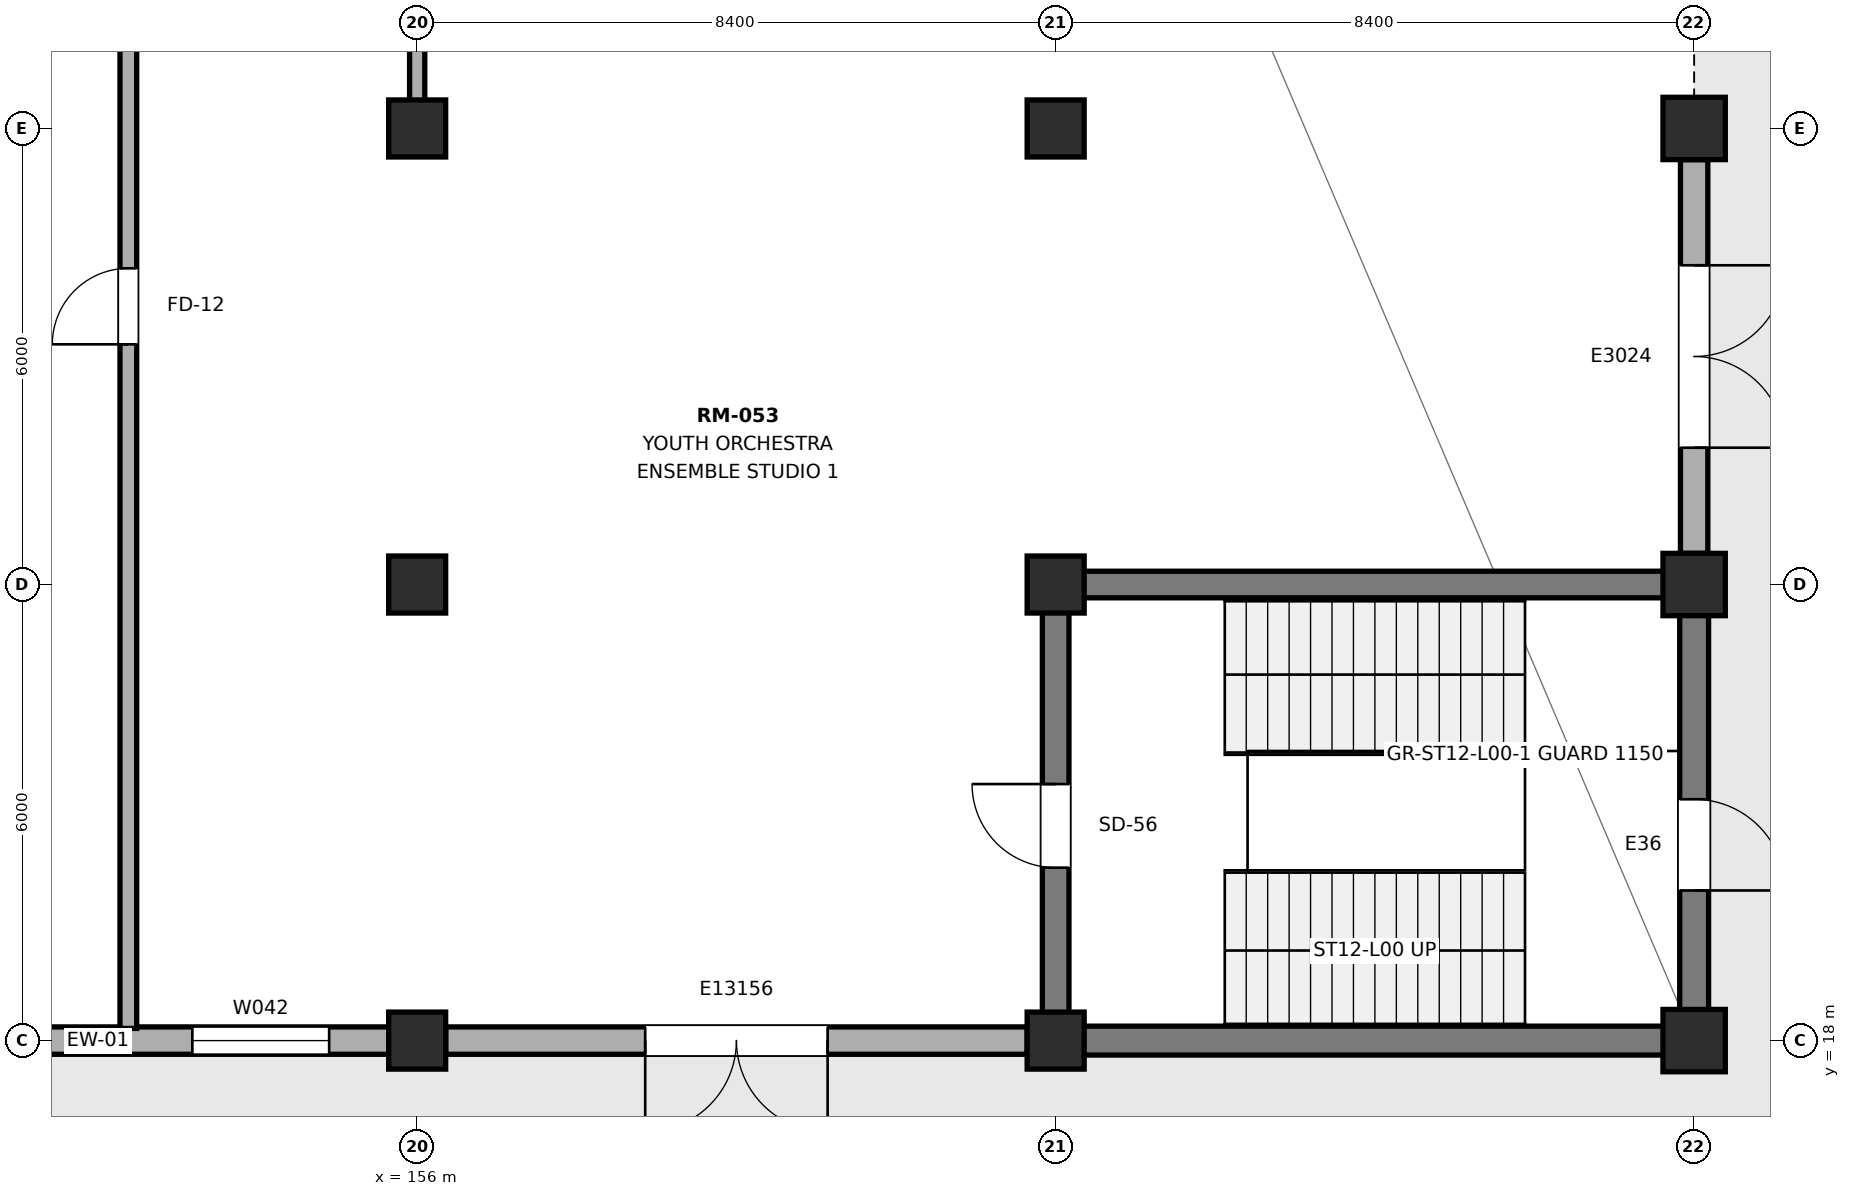
"""IFC4 building model, lengths in metres.
Left out: names, types, materials, properties, quantities, classifications, styles, units other than length and angle.
Written with IfcOpenShell. Run it as: python <this file> out.ifc"""

import sys

from ifc_helpers import new_model, si_unit, direction, frame, frame_2d, origin, origin_2d, place, context, subcontext, project, spatial, rectangle, extrude, element, fill, save


model = new_model("IFC4")
c1 = context("Model", 3, precision=1e-05, world=origin(), true_north=direction((0.0, 1.0)))
c2 = subcontext(c1, "Body", "Model", "MODEL_VIEW")
j1 = project(units=[si_unit("LENGTHUNIT", "METRE"), si_unit("PLANEANGLEUNIT", "RADIAN")], contexts=[c1])
p1 = place(None, origin())
s1 = spatial("IfcSite", under=j1, at=p1, CompositionType="ELEMENT")
p2 = place(p1, origin())
s2 = spatial("IfcBuilding", under=s1, at=p2, CompositionType="ELEMENT")
p3 = place(p2, origin())
s3 = spatial("IfcBuildingStorey", under=s2, at=p3, CompositionType="ELEMENT", Elevation=0.0)
for number, where, z_axis, x_axis in (
    (1, (156.0, 18.0, 0.0), (0.0, 0.0, 1.0), (1.0, 0.0, 0.0)),
    (2, (156.0, 24.0, 0.0), (0.0, 0.0, 1.0), (1.0, 0.0, 0.0)),
    (3, (156.0, 30.0, 0.0), (0.0, 0.0, 1.0), (1.0, 0.0, 0.0)),
    (4, (164.4, 18.0, 0.0), (0.0, 0.0, 1.0), (1.0, 0.0, 0.0)),
    (5, (164.4, 24.0, 0.0), (0.0, 0.0, 1.0), (1.0, 0.0, 0.0)),
    (6, (164.4, 30.0, 0.0), (0.0, 0.0, 1.0), (1.0, 0.0, 0.0)),
):
    element("IfcColumn", number, at=place(p3, frame(where, z_axis=z_axis, x_axis=x_axis)), inside=s3, PredefinedType="COLUMN", context=c2, shape_type="SweptSolid", body=[
        extrude(rectangle(XDim=0.75, YDim=0.75, at=origin_2d()), origin(), (0.0, 0.0, 1.0), 5.4),
    ])
for number, where, z_axis, x_axis in (
    (7, (172.8, 18.0, 0.0), (0.0, 0.0, 1.0), (1.0, 0.0, 0.0)),
    (8, (172.8, 24.0, 0.0), (0.0, 0.0, 1.0), (1.0, 0.0, 0.0)),
    (9, (172.8, 30.0, 0.0), (0.0, 0.0, 1.0), (1.0, 0.0, 0.0)),
):
    element("IfcColumn", number, at=place(p3, frame(where, z_axis=z_axis, x_axis=x_axis)), inside=s3, PredefinedType="COLUMN", context=c2, shape_type="SweptSolid", body=[
        extrude(rectangle(XDim=0.82, YDim=0.82, at=origin_2d()), origin(), (0.0, 0.0, 1.0), 5.4),
    ])
p4 = place(p3, frame((164.225, 18.0, 0.0), z_axis=(0.0, 0.0, 1.0), x_axis=(1.0, 0.0, 0.0)))
e10 = element("IfcWall", 10, at=p4, inside=s3, PredefinedType="SHEAR", context=c2, shape_type="SweptSolid", body=[
    extrude(rectangle(XDim=8.75, YDim=0.38, at=frame_2d((4.375, 0.0))), origin(), (0.0, 0.0, 1.0), 5.4),
])
p5 = place(p3, frame((164.225, 24.0, 0.0), z_axis=(0.0, 0.0, 1.0), x_axis=(1.0, 0.0, 0.0)))
e11 = element("IfcWall", 11, at=p5, inside=s3, PredefinedType="SHEAR", context=c2, shape_type="SweptSolid", body=[
    extrude(rectangle(XDim=8.75, YDim=0.35, at=frame_2d((4.375, 0.0))), origin(), (0.0, 0.0, 1.0), 5.4),
])
p6 = place(p3, frame((164.4, 18.175, 0.0), z_axis=(0.0, 0.0, 1.0), x_axis=(0.0, 1.0, 0.0)))
e12 = element("IfcWall", 12, at=p6, inside=s3, PredefinedType="SHEAR", context=c2, shape_type="SweptSolid", body=[
    extrude(rectangle(XDim=5.65, YDim=0.35, at=frame_2d((2.825, 0.0))), origin(), (0.0, 0.0, 1.0), 5.4),
])
p7 = place(p6, frame((2.1, 0.0, 0.0)))
e13 = element("IfcOpeningElement", 13, at=p7, cuts=e12, PredefinedType="OPENING", context=c2, shape_type="SweptSolid", body=[
    extrude(rectangle(XDim=1.1, YDim=2.2, at=frame_2d((0.55, 1.1))), frame((0.0, 0.185, 0.0), z_axis=(0.0, -1.0, 0.0), x_axis=(1.0, 0.0, 0.0)), (0.0, 0.0, 1.0), 0.37),
])
p8 = place(p3, frame((172.8, 18.175, 0.0), z_axis=(0.0, 0.0, 1.0), x_axis=(0.0, 1.0, 0.0)))
e14 = element("IfcWall", 14, at=p8, inside=s3, PredefinedType="SHEAR", context=c2, shape_type="SweptSolid", body=[
    extrude(rectangle(XDim=5.65, YDim=0.38, at=frame_2d((2.825, 0.0))), origin(), (0.0, 0.0, 1.0), 5.4),
])
p9 = place(p8, frame((1.8, 0.0, 0.0)))
e15 = element("IfcOpeningElement", 15, at=p9, cuts=e14, PredefinedType="OPENING", context=c2, shape_type="SweptSolid", body=[
    extrude(rectangle(XDim=1.2, YDim=2.3, at=frame_2d((0.6, 1.15))), frame((0.0, 0.2, 0.0), z_axis=(0.0, -1.0, 0.0), x_axis=(1.0, 0.0, 0.0)), (0.0, 0.0, 1.0), 0.4),
])
p10 = place(p3, frame((147.975, 18.0, 0.0), z_axis=(0.0, 0.0, 1.0), x_axis=(1.0, 0.0, 0.0)))
e16 = element("IfcWall", 16, at=p10, inside=s3, PredefinedType="SOLIDWALL", context=c2, shape_type="SweptSolid", body=[
    extrude(rectangle(XDim=7.65, YDim=0.36, at=frame_2d((3.825, 0.0))), origin(), (0.0, 0.0, 1.0), 4.35),
])
p11 = place(p10, frame((5.067, 0.0, 0.9)))
e17 = element("IfcOpeningElement", 17, at=p11, cuts=e16, PredefinedType="OPENING", context=c2, shape_type="SweptSolid", body=[
    extrude(rectangle(XDim=1.8, YDim=1.8, at=frame_2d((0.9, 0.9))), frame((0.0, 0.19, 0.0), z_axis=(0.0, -1.0, 0.0), x_axis=(1.0, 0.0, 0.0)), (0.0, 0.0, 1.0), 0.38),
])
p12 = place(p3, frame((156.375, 18.0, 0.0), z_axis=(0.0, 0.0, 1.0), x_axis=(1.0, 0.0, 0.0)))
e18 = element("IfcWall", 18, at=p12, inside=s3, PredefinedType="SOLIDWALL", context=c2, shape_type="SweptSolid", body=[
    extrude(rectangle(XDim=7.65, YDim=0.36, at=frame_2d((3.825, 0.0))), origin(), (0.0, 0.0, 1.0), 4.35),
])
p13 = place(p12, frame((2.625, 0.0, 0.0)))
e19 = element("IfcOpeningElement", 19, at=p13, cuts=e18, PredefinedType="OPENING", context=c2, shape_type="SweptSolid", body=[
    extrude(rectangle(XDim=2.4, YDim=2.6, at=frame_2d((1.2, 1.3))), frame((0.0, 0.19, 0.0), z_axis=(0.0, -1.0, 0.0), x_axis=(1.0, 0.0, 0.0)), (0.0, 0.0, 1.0), 0.38),
])
p14 = place(p3, frame((172.8, 24.41, 0.0), z_axis=(0.0, 0.0, 1.0), x_axis=(0.0, 1.0, 0.0)))
e20 = element("IfcWall", 20, at=p14, inside=s3, PredefinedType="SOLIDWALL", context=c2, shape_type="SweptSolid", body=[
    extrude(rectangle(XDim=5.18, YDim=0.36, at=frame_2d((2.59, 0.0))), origin(), (0.0, 0.0, 1.0), 4.4),
])
p15 = place(p14, frame((1.39, 0.0, 0.0)))
e21 = element("IfcOpeningElement", 21, at=p15, cuts=e20, PredefinedType="OPENING", context=c2, shape_type="SweptSolid", body=[
    extrude(rectangle(XDim=2.4, YDim=2.6, at=frame_2d((1.2, 1.3))), frame((0.0, 0.19, 0.0), z_axis=(0.0, -1.0, 0.0), x_axis=(1.0, 0.0, 0.0)), (0.0, 0.0, 1.0), 0.38),
])
p16 = place(p3, frame((152.2, 18.16, 0.0), z_axis=(0.0, 0.0, 1.0), x_axis=(0.0, 1.0, 0.0)))
e22 = element("IfcWall", 22, at=p16, inside=s3, PredefinedType="PARTITIONING", context=c2, shape_type="SweptSolid", body=[
    extrude(rectangle(XDim=20.08, YDim=0.22, at=frame_2d((10.04, 0.0))), origin(), (0.0, 0.0, 1.0), 5.09),
])
p17 = place(p16, frame((9.0, 0.0, 0.0)))
e23 = element("IfcOpeningElement", 23, at=p17, cuts=e22, PredefinedType="OPENING", context=c2, shape_type="SweptSolid", body=[
    extrude(rectangle(XDim=1.0, YDim=2.2, at=frame_2d((0.5, 1.1))), frame((0.0, 0.12, 0.0), z_axis=(0.0, -1.0, 0.0), x_axis=(1.0, 0.0, 0.0)), (0.0, 0.0, 1.0), 0.24),
])
p18 = place(p3, frame((156.0, 30.36, 0.0), z_axis=(0.0, 0.0, 1.0), x_axis=(0.0, 1.0, 0.0)))
e24 = element("IfcWall", 24, at=p18, inside=s3, PredefinedType="PARTITIONING", context=c2, shape_type="SweptSolid", body=[
    extrude(rectangle(XDim=68.86, YDim=0.2, at=frame_2d((34.43, 0.0))), origin(), (0.0, 0.0, 1.0), 4.3),
])
p19 = place(p18, frame((12.0, 0.0, 0.0)))
e25 = element("IfcOpeningElement", 25, at=p19, cuts=e24, PredefinedType="OPENING", context=c2, shape_type="SweptSolid", body=[
    extrude(rectangle(XDim=1.05, YDim=2.25, at=frame_2d((0.525, 1.125))), frame((0.0, 0.11, 0.0), z_axis=(0.0, -1.0, 0.0), x_axis=(1.0, 0.0, 0.0)), (0.0, 0.0, 1.0), 0.22),
])
p20 = place(p18, frame((30.0, 0.0, 0.0)))
e26 = element("IfcOpeningElement", 26, at=p20, cuts=e24, PredefinedType="OPENING", context=c2, shape_type="SweptSolid", body=[
    extrude(rectangle(XDim=1.02, YDim=2.18, at=frame_2d((0.51, 1.09))), frame((0.0, 0.11, 0.0), z_axis=(0.0, -1.0, 0.0), x_axis=(1.0, 0.0, 0.0)), (0.0, 0.0, 1.0), 0.22),
])
p21 = place(p18, frame((65.8, 0.0, 0.0)))
e27 = element("IfcOpeningElement", 27, at=p21, cuts=e24, PredefinedType="OPENING", context=c2, shape_type="SweptSolid", body=[
    extrude(rectangle(XDim=0.92, YDim=2.15, at=frame_2d((0.46, 1.075))), frame((0.0, 0.11, 0.0), z_axis=(0.0, -1.0, 0.0), x_axis=(1.0, 0.0, 0.0)), (0.0, 0.0, 1.0), 0.22),
])
p22 = place(p11, origin())
e28 = element("IfcWindow", 28, at=p22, inside=s3, PartitioningType="SINGLE_PANEL", PredefinedType="WINDOW", context=c2, shape_type="SweptSolid", body=[
    extrude(rectangle(XDim=1.8, YDim=1.8, at=frame_2d((0.9, 0.9))), frame((0.0, 0.03, 0.0), z_axis=(0.0, -1.0, 0.0), x_axis=(1.0, 0.0, 0.0)), (0.0, 0.0, 1.0), 0.06),
])
fill(e17, e28)
p23 = place(p13, frame((2.4, 0.0, 0.0), z_axis=(0.0, 0.0, 1.0), x_axis=(-1.0, 0.0, 0.0)))
e29 = element("IfcDoor", 29, at=p23, inside=s3, OperationType="DOUBLE_DOOR_SINGLE_SWING", PredefinedType="DOOR", context=c2, shape_type="SweptSolid", body=[
    extrude(rectangle(XDim=2.4, YDim=2.6, at=frame_2d((1.2, 1.3))), frame((0.0, 0.025, 0.0), z_axis=(0.0, -1.0, 0.0), x_axis=(1.0, 0.0, 0.0)), (0.0, 0.0, 1.0), 0.05),
])
fill(e19, e29)
p24 = place(p15, frame((2.4, 0.0, 0.0), z_axis=(0.0, 0.0, 1.0), x_axis=(-1.0, 0.0, 0.0)))
e30 = element("IfcDoor", 30, at=p24, inside=s3, OperationType="DOUBLE_DOOR_SINGLE_SWING", PredefinedType="DOOR", context=c2, shape_type="SweptSolid", body=[
    extrude(rectangle(XDim=2.4, YDim=2.6, at=frame_2d((1.2, 1.3))), frame((0.0, 0.025, 0.0), z_axis=(0.0, -1.0, 0.0), x_axis=(1.0, 0.0, 0.0)), (0.0, 0.0, 1.0), 0.05),
])
fill(e21, e30)
p25 = place(p9, frame((1.2, 0.0, 0.0), z_axis=(0.0, 0.0, 1.0), x_axis=(-1.0, 0.0, 0.0)))
e31 = element("IfcDoor", 31, at=p25, inside=s3, OperationType="SINGLE_SWING_LEFT", PredefinedType="DOOR", context=c2, shape_type="SweptSolid", body=[
    extrude(rectangle(XDim=1.2, YDim=2.3, at=frame_2d((0.6, 1.15))), frame((0.0, 0.025, 0.0), z_axis=(0.0, -1.0, 0.0), x_axis=(1.0, 0.0, 0.0)), (0.0, 0.0, 1.0), 0.05),
])
fill(e15, e31)
p26 = place(p17, origin())
e32 = element("IfcDoor", 32, at=p26, inside=s3, OperationType="SINGLE_SWING_LEFT", PredefinedType="DOOR", context=c2, shape_type="SweptSolid", body=[
    extrude(rectangle(XDim=1.0, YDim=2.2, at=frame_2d((0.5, 1.1))), frame((0.0, 0.025, 0.0), z_axis=(0.0, -1.0, 0.0), x_axis=(1.0, 0.0, 0.0)), (0.0, 0.0, 1.0), 0.05),
])
fill(e23, e32)
p27 = place(p7, origin())
e33 = element("IfcDoor", 33, at=p27, inside=s3, OperationType="SINGLE_SWING_RIGHT", PredefinedType="DOOR", context=c2, shape_type="SweptSolid", body=[
    extrude(rectangle(XDim=1.1, YDim=2.2, at=frame_2d((0.55, 1.1))), frame((0.0, 0.025, 0.0), z_axis=(0.0, -1.0, 0.0), x_axis=(1.0, 0.0, 0.0)), (0.0, 0.0, 1.0), 0.05),
])
fill(e13, e33)
save(model, sys.argv[1])
